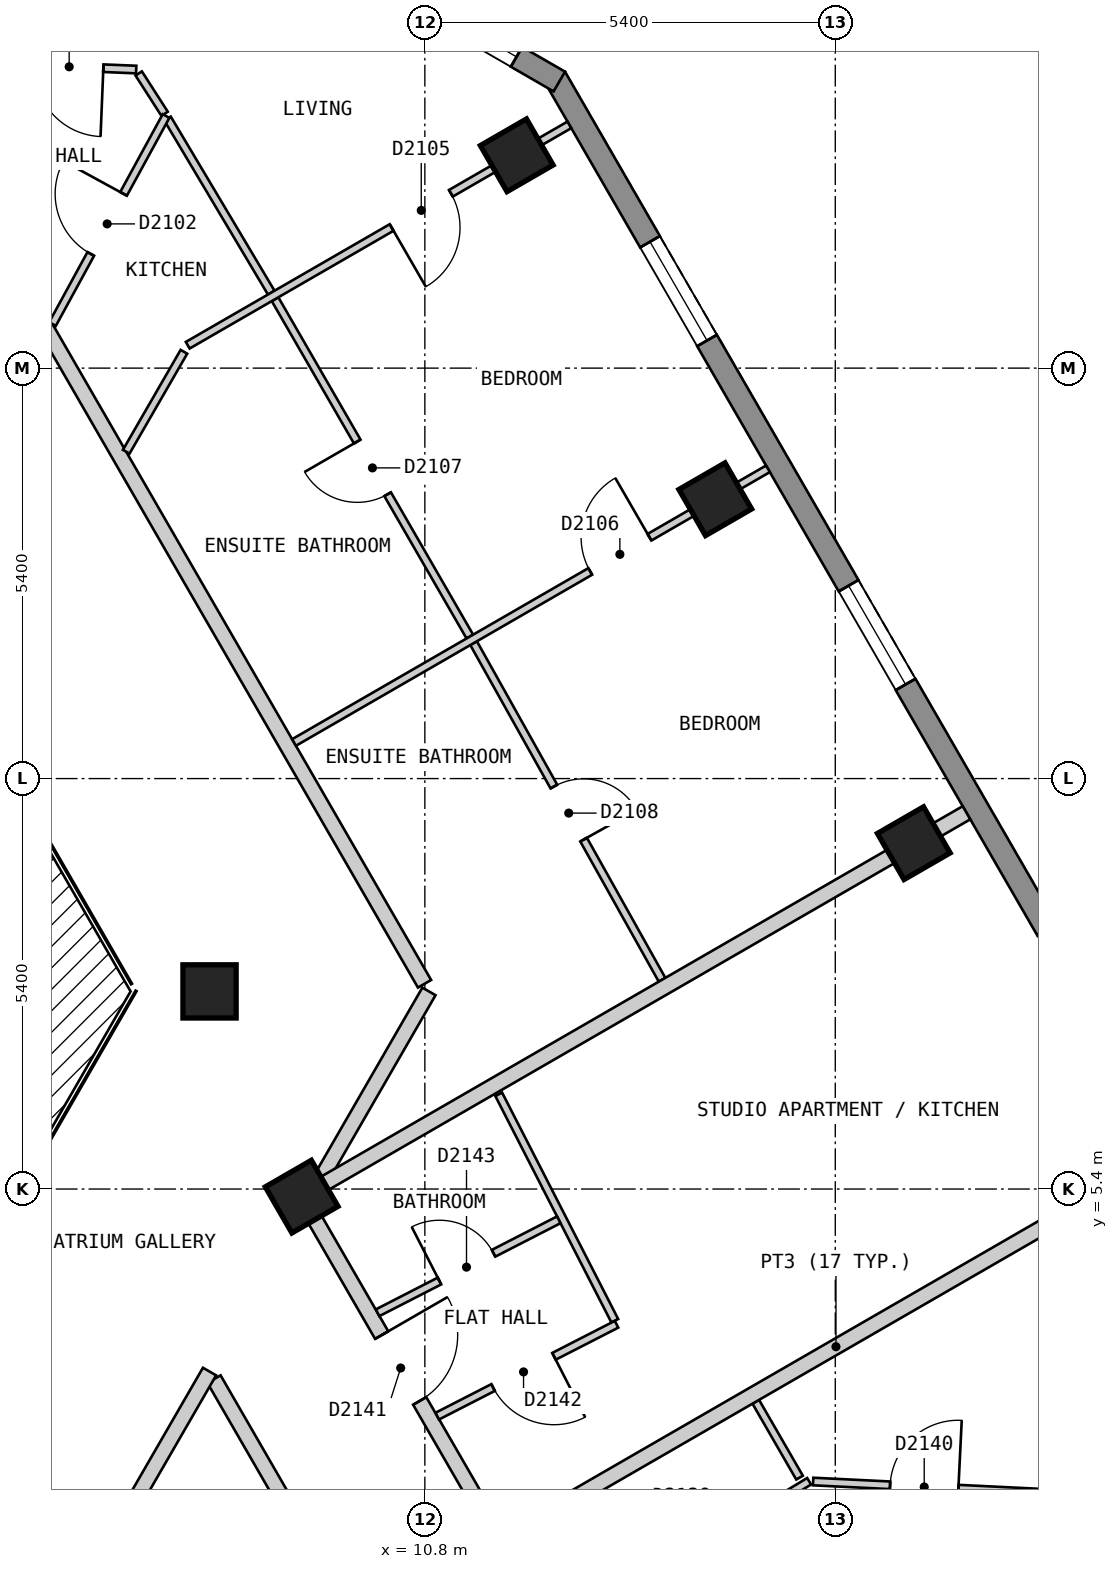
"""IFC4 building model, lengths in metres.
Left out: names, types, materials, properties, quantities, classifications, styles, units other than length and angle.
Written with IfcOpenShell. Run it as: python <this file> out.ifc"""

import sys

from ifc_helpers import new_model, si_unit, direction, frame, frame_2d, origin, origin_2d, place, context, subcontext, project, spatial, polyline, rectangle, outline, extrude, element, fill, save


model = new_model("IFC4")
c1 = context("Model", 3, precision=1e-05, world=origin(), true_north=direction((0.0, 1.0)))
c2 = subcontext(c1, "Body", "Model", "MODEL_VIEW")
j1 = project(units=[si_unit("LENGTHUNIT", "METRE"), si_unit("PLANEANGLEUNIT", "RADIAN")], contexts=[c1])
p1 = place(None, origin())
s1 = spatial("IfcSite", under=j1, at=p1, CompositionType="ELEMENT")
p2 = place(p1, origin())
s2 = spatial("IfcBuilding", under=s1, at=p2, CompositionType="ELEMENT")
p3 = place(p2, frame((0.0, 0.0, 205.8)))
s3 = spatial("IfcBuildingStorey", under=s2, at=p3, CompositionType="ELEMENT", Elevation=205.8)
for number, where, z_axis, x_axis in (
    (1, (17.233, 9.95, 0.0), (0.0, 0.0, 1.0), (-0.5, 0.866, 0.0)),
    (2, (14.621, 14.475, 0.0), (0.0, 0.0, 1.0), (-0.5, 0.866, 0.0)),
    (3, (12.009, 19.0, 0.0), (0.0, 0.0, 1.0), (-0.5, 0.866, 0.0)),
    (4, (9.179, 5.3, 0.0), (0.0, 0.0, 1.0), (-0.5, 0.866, 0.0)),
    (5, (7.967, 8.0, 0.0), (0.0, 0.0, 1.0), (1.0, 0.0, 0.0)),
):
    element("IfcColumn", number, at=place(p3, frame(where, z_axis=z_axis, x_axis=x_axis)), inside=s3, PredefinedType="COLUMN", context=c2, shape_type="SweptSolid", body=[
        extrude(rectangle(XDim=0.7, YDim=0.7, at=origin_2d()), origin(), (0.0, 0.0, 1.0), 3.0),
    ])
p4 = place(p3, frame((23.599, 0.825, 0.0), z_axis=(0.0, 0.0, 1.0), x_axis=(-0.500003656944, 0.866023292436, 0.0)))
e6 = element("IfcWall", 6, at=p4, inside=s3, PredefinedType="SOLIDWALL", context=c2, shape_type="SweptSolid", body=[
    extrude(outline(polyline([(0.0, -0.15), (22.17, -0.15), (22.09, 0.15), (0.08, 0.15), (0.0, -0.15)])), origin(), (0.0, 0.0, 1.0), 2.7),
])
p5 = place(p4, frame((2.497, 0.0, 0.15)))
e7 = element("IfcOpeningElement", 7, at=p5, cuts=e6, PredefinedType="OPENING", context=c2, shape_type="SweptSolid", body=[
    extrude(rectangle(XDim=1.5, YDim=2.1, at=frame_2d((0.75, 1.05))), frame((0.0, 0.16, 0.0), z_axis=(0.0, -1.0, 0.0), x_axis=(1.0, 0.0, 0.0)), (0.0, 0.0, 1.0), 0.32),
])
p6 = place(p4, frame((7.723, 0.0, 0.15)))
e8 = element("IfcOpeningElement", 8, at=p6, cuts=e6, PredefinedType="OPENING", context=c2, shape_type="SweptSolid", body=[
    extrude(rectangle(XDim=1.5, YDim=2.1, at=frame_2d((0.75, 1.05))), frame((0.0, 0.16, 0.0), z_axis=(0.0, -1.0, 0.0), x_axis=(1.0, 0.0, 0.0)), (0.0, 0.0, 1.0), 0.32),
])
p7 = place(p4, frame((12.948, 0.0, 0.15)))
e9 = element("IfcOpeningElement", 9, at=p7, cuts=e6, PredefinedType="OPENING", context=c2, shape_type="SweptSolid", body=[
    extrude(rectangle(XDim=1.5, YDim=2.1, at=frame_2d((0.75, 1.05))), frame((0.0, 0.16, 0.0), z_axis=(0.0, -1.0, 0.0), x_axis=(1.0, 0.0, 0.0)), (0.0, 0.0, 1.0), 0.32),
])
p8 = place(p4, frame((18.173, 0.0, 0.15)))
e10 = element("IfcOpeningElement", 10, at=p8, cuts=e6, PredefinedType="OPENING", context=c2, shape_type="SweptSolid", body=[
    extrude(rectangle(XDim=1.5, YDim=2.1, at=frame_2d((0.75, 1.05))), frame((0.0, 0.16, 0.0), z_axis=(0.0, -1.0, 0.0), x_axis=(1.0, 0.0, 0.0)), (0.0, 0.0, 1.0), 0.32),
])
p9 = place(p3, frame((12.569, 19.97, 0.0), z_axis=(0.0, 0.0, 1.0), x_axis=(-0.866022959057, 0.500004234368, 0.0)))
e11 = element("IfcWall", 11, at=p9, inside=s3, PredefinedType="SOLIDWALL", context=c2, shape_type="SweptSolid", body=[
    extrude(outline(polyline([(0.0, -0.15), (5.0, -0.15), (4.92, 0.15), (0.08, 0.15), (0.0, -0.15)])), origin(), (0.0, 0.0, 1.0), 2.7),
])
p10 = place(p9, frame((0.65, 0.0, 0.15)))
e12 = element("IfcOpeningElement", 12, at=p10, cuts=e11, PredefinedType="OPENING", context=c2, shape_type="SweptSolid", body=[
    extrude(rectangle(XDim=1.2, YDim=2.1, at=frame_2d((0.6, 1.05))), frame((0.0, 0.16, 0.0), z_axis=(0.0, -1.0, 0.0), x_axis=(1.0, 0.0, 0.0)), (0.0, 0.0, 1.0), 0.32),
])
p11 = place(p3, frame((8.026, 2.899, 0.0), z_axis=(0.0, 0.0, 1.0), x_axis=(0.499986018985, -0.866033475577, 0.0)))
e13 = element("IfcWall", 13, at=p11, inside=s3, PredefinedType="PARTITIONING", context=c2, shape_type="SweptSolid", body=[
    extrude(rectangle(XDim=5.078, YDim=0.2, at=frame_2d((2.539, 0.0))), origin(), (0.0, 0.0, 1.0), 2.7),
])
p12 = place(p11, frame((2.089, 0.0, 0.0)))
e14 = element("IfcOpeningElement", 14, at=p12, cuts=e13, PredefinedType="OPENING", context=c2, shape_type="SweptSolid", body=[
    extrude(rectangle(XDim=0.9, YDim=2.1, at=frame_2d((0.45, 1.05))), frame((0.0, 0.11, 0.0), z_axis=(0.0, -1.0, 0.0), x_axis=(1.0, 0.0, 0.0)), (0.0, 0.0, 1.0), 0.22),
])
p13 = place(p3, frame((9.238, 5.2, 0.0), z_axis=(0.0, 0.0, 1.0), x_axis=(0.500025705601, -0.86601056214, 0.0)))
e15 = element("IfcWall", 15, at=p13, inside=s3, PredefinedType="PARTITIONING", context=c2, shape_type="SweptSolid", body=[
    extrude(rectangle(XDim=7.735, YDim=0.2, at=frame_2d((3.868, 0.0))), origin(), (0.0, 0.0, 1.0), 2.7),
])
p14 = place(p13, frame((6.705, 0.0, 0.0)))
e16 = element("IfcOpeningElement", 16, at=p14, cuts=e15, PredefinedType="OPENING", context=c2, shape_type="SweptSolid", body=[
    extrude(rectangle(XDim=1.0, YDim=2.1, at=frame_2d((0.5, 1.05))), frame((0.0, 0.11, 0.0), z_axis=(0.0, -1.0, 0.0), x_axis=(1.0, 0.0, 0.0)), (0.0, 0.0, 1.0), 0.22),
])
p15 = place(p13, frame((1.988, 0.0, 0.0)))
e17 = element("IfcOpeningElement", 17, at=p15, cuts=e15, PredefinedType="OPENING", context=c2, shape_type="SweptSolid", body=[
    extrude(rectangle(XDim=1.0, YDim=2.1, at=frame_2d((0.5, 1.05))), frame((0.0, 0.11, 0.0), z_axis=(0.0, -1.0, 0.0), x_axis=(1.0, 0.0, 0.0)), (0.0, 0.0, 1.0), 0.22),
])
p16 = place(p3, frame((5.485, 17.3, 0.0), z_axis=(0.0, 0.0, 1.0), x_axis=(0.499943285704, -0.866058145322, 0.0)))
e18 = element("IfcWall", 18, at=p16, inside=s3, PredefinedType="PARTITIONING", context=c2, shape_type="SweptSolid", body=[
    extrude(rectangle(XDim=10.623, YDim=0.2, at=frame_2d((5.312, 0.0))), origin(), (0.0, 0.0, 1.0), 2.7),
])
p17 = place(p3, frame((6.928, 1.2, 0.0), z_axis=(0.0, 0.0, 1.0), x_axis=(0.500132712588, 0.865948768577, 0.0)))
e19 = element("IfcWall", 19, at=p17, inside=s3, PredefinedType="PARTITIONING", context=c2, shape_type="SweptSolid", body=[
    extrude(rectangle(XDim=2.078, YDim=0.2, at=frame_2d((1.039, 0.0))), origin(), (0.0, 0.0, 1.0), 2.7),
])
p18 = place(p3, frame((9.454, 5.574, 0.0), z_axis=(0.0, 0.0, 1.0), x_axis=(0.499795394297, 0.86614350072, 0.0)))
e20 = element("IfcWall", 20, at=p18, inside=s3, PredefinedType="PARTITIONING", context=c2, shape_type="SweptSolid", body=[
    extrude(rectangle(XDim=2.801, YDim=0.2, at=frame_2d((1.4, 0.0))), origin(), (0.0, 0.0, 1.0), 2.7),
])
p19 = place(p3, frame((7.035, 20.077, 0.0), z_axis=(0.0, 0.0, 1.0), x_axis=(0.540425167977, -0.841392083286, 0.0)))
e21 = element("IfcWall", 21, at=p19, inside=s3, PredefinedType="PARTITIONING", context=c2, shape_type="SweptSolid", body=[
    extrude(rectangle(XDim=0.631, YDim=0.1, at=frame_2d((0.315, 0.0))), origin(), (0.0, 0.0, 1.0), 2.7),
])
p20 = place(p3, frame((7.414, 19.484, 0.0), z_axis=(0.0, 0.0, 1.0), x_axis=(0.511881371655, -0.859056145634, 0.0)))
e22 = element("IfcWall", 22, at=p20, inside=s3, PredefinedType="PARTITIONING", context=c2, shape_type="SweptSolid", body=[
    extrude(rectangle(XDim=2.667, YDim=0.1, at=frame_2d((1.333, 0.0))), origin(), (0.0, 0.0, 1.0), 2.7),
])
p21 = place(p3, frame((15.154, 2.601, 0.0), z_axis=(0.0, 0.0, 1.0), x_axis=(0.499808046739, -0.866136199691, 0.0)))
e23 = element("IfcWall", 23, at=p21, inside=s3, PredefinedType="PARTITIONING", context=c2, shape_type="SweptSolid", body=[
    extrude(rectangle(XDim=1.152, YDim=0.1, at=frame_2d((0.576, 0.0))), origin(), (0.0, 0.0, 1.0), 2.7),
])
p22 = place(p3, frame((8.829, 17.107, 0.0), z_axis=(0.0, 0.0, 1.0), x_axis=(0.500022055211, -0.866012669828, 0.0)))
e24 = element("IfcWall", 24, at=p22, inside=s3, PredefinedType="PARTITIONING", context=c2, shape_type="SweptSolid", body=[
    extrude(rectangle(XDim=5.126, YDim=0.1, at=frame_2d((2.563, 0.0))), origin(), (0.0, 0.0, 1.0), 2.7),
])
p23 = place(p22, frame((2.163, 0.0, 0.0)))
e25 = element("IfcOpeningElement", 25, at=p23, cuts=e24, PredefinedType="OPENING", context=c2, shape_type="SweptSolid", body=[
    extrude(rectangle(XDim=0.8, YDim=2.1, at=frame_2d((0.4, 1.05))), frame((0.0, 0.06, 0.0), z_axis=(0.0, -1.0, 0.0), x_axis=(1.0, 0.0, 0.0)), (0.0, 0.0, 1.0), 0.12),
])
p24 = place(p3, frame((11.441, 12.582, 0.0), z_axis=(0.0, 0.0, 1.0), x_axis=(0.488568218554, -0.872525699231, 0.0)))
e26 = element("IfcWall", 26, at=p24, inside=s3, PredefinedType="PARTITIONING", context=c2, shape_type="SweptSolid", body=[
    extrude(rectangle(XDim=5.076, YDim=0.1, at=frame_2d((2.538, 0.0))), origin(), (0.0, 0.0, 1.0), 2.7),
])
p25 = place(p24, frame((2.163, 0.0, 0.0)))
e27 = element("IfcOpeningElement", 27, at=p25, cuts=e26, PredefinedType="OPENING", context=c2, shape_type="SweptSolid", body=[
    extrude(rectangle(XDim=0.8, YDim=2.1, at=frame_2d((0.4, 1.05))), frame((0.0, 0.06, 0.0), z_axis=(0.0, -1.0, 0.0), x_axis=(1.0, 0.0, 0.0)), (0.0, 0.0, 1.0), 0.12),
])
p26 = place(p3, frame((11.772, 6.646, 0.0), z_axis=(0.0, 0.0, 1.0), x_axis=(0.456175983405, -0.889889584254, 0.0)))
e28 = element("IfcWall", 28, at=p26, inside=s3, PredefinedType="PARTITIONING", context=c2, shape_type="SweptSolid", body=[
    extrude(rectangle(XDim=3.348, YDim=0.1, at=frame_2d((1.674, 0.0))), origin(), (0.0, 0.0, 1.0), 2.7),
])
p27 = place(p3, frame((5.294, 20.198, 0.0), z_axis=(0.0, 0.0, 1.0), x_axis=(0.999159599203, -0.040988965834, 0.0)))
e29 = element("IfcWall", 29, at=p27, inside=s3, PredefinedType="PARTITIONING", context=c2, shape_type="SweptSolid", body=[
    extrude(rectangle(XDim=1.709, YDim=0.1, at=frame_2d((0.855, 0.0))), origin(), (0.0, 0.0, 1.0), 2.7),
])
p28 = place(p27, frame((0.377, 0.0, 0.0)))
e30 = element("IfcOpeningElement", 30, at=p28, cuts=e29, PredefinedType="OPENING", context=c2, shape_type="SweptSolid", body=[
    extrude(rectangle(XDim=0.9, YDim=2.1, at=frame_2d((0.45, 1.05))), frame((0.0, 0.06, 0.0), z_axis=(0.0, -1.0, 0.0), x_axis=(1.0, 0.0, 0.0)), (0.0, 0.0, 1.0), 0.12),
])
p29 = place(p3, frame((15.909, 1.552, 0.0), z_axis=(0.0, 0.0, 1.0), x_axis=(0.998799003463, -0.048995414909, 0.0)))
e31 = element("IfcWall", 31, at=p29, inside=s3, PredefinedType="PARTITIONING", context=c2, shape_type="SweptSolid", body=[
    extrude(rectangle(XDim=3.244, YDim=0.1, at=frame_2d((1.622, 0.0))), origin(), (0.0, 0.0, 1.0), 2.7),
])
p30 = place(p29, frame((1.013, 0.0, 0.0)))
e32 = element("IfcOpeningElement", 32, at=p30, cuts=e31, PredefinedType="OPENING", context=c2, shape_type="SweptSolid", body=[
    extrude(rectangle(XDim=0.9, YDim=2.1, at=frame_2d((0.45, 1.05))), frame((0.0, 0.06, 0.0), z_axis=(0.0, -1.0, 0.0), x_axis=(1.0, 0.0, 0.0)), (0.0, 0.0, 1.0), 0.12),
])
p31 = place(p3, frame((6.871, 15.1, 0.0), z_axis=(0.0, 0.0, 1.0), x_axis=(0.499805980977, 0.866137391745, 0.0)))
e33 = element("IfcWall", 33, at=p31, inside=s3, PredefinedType="PARTITIONING", context=c2, shape_type="SweptSolid", body=[
    extrude(rectangle(XDim=1.518, YDim=0.1, at=frame_2d((0.759, 0.0))), origin(), (0.0, 0.0, 1.0), 2.7),
])
p32 = place(p3, frame((5.901, 16.78, 0.0), z_axis=(0.0, 0.0, 1.0), x_axis=(0.479148317257, 0.877733951759, 0.0)))
e34 = element("IfcWall", 34, at=p32, inside=s3, PredefinedType="PARTITIONING", context=c2, shape_type="SweptSolid", body=[
    extrude(rectangle(XDim=3.118, YDim=0.1, at=frame_2d((1.559, 0.0))), origin(), (0.0, 0.0, 1.0), 2.7),
])
p33 = place(p32, frame((1.051, 0.0, 0.0)))
e35 = element("IfcOpeningElement", 35, at=p33, cuts=e34, PredefinedType="OPENING", context=c2, shape_type="SweptSolid", body=[
    extrude(rectangle(XDim=0.9, YDim=2.1, at=frame_2d((0.45, 1.05))), frame((0.0, 0.06, 0.0), z_axis=(0.0, -1.0, 0.0), x_axis=(1.0, 0.0, 0.0)), (0.0, 0.0, 1.0), 0.12),
])
p34 = place(p3, frame((10.178, 3.772, 0.0), z_axis=(0.0, 0.0, 1.0), x_axis=(0.889732071959, 0.456483121405, 0.0)))
e36 = element("IfcWall", 36, at=p34, inside=s3, PredefinedType="PARTITIONING", context=c2, shape_type="SweptSolid", body=[
    extrude(rectangle(XDim=2.679, YDim=0.1, at=frame_2d((1.34, 0.0))), origin(), (0.0, 0.0, 1.0), 2.7),
])
p35 = place(p34, frame((0.915, 0.0, 0.0)))
e37 = element("IfcOpeningElement", 37, at=p35, cuts=e36, PredefinedType="OPENING", context=c2, shape_type="SweptSolid", body=[
    extrude(rectangle(XDim=0.8, YDim=2.1, at=frame_2d((0.4, 1.05))), frame((0.0, 0.06, 0.0), z_axis=(0.0, -1.0, 0.0), x_axis=(1.0, 0.0, 0.0)), (0.0, 0.0, 1.0), 0.12),
])
p36 = place(p3, frame((10.963, 2.412, 0.0), z_axis=(0.0, 0.0, 1.0), x_axis=(0.889943997558, 0.456069820543, 0.0)))
e38 = element("IfcWall", 38, at=p36, inside=s3, PredefinedType="PARTITIONING", context=c2, shape_type="SweptSolid", body=[
    extrude(rectangle(XDim=2.651, YDim=0.1, at=frame_2d((1.325, 0.0))), origin(), (0.0, 0.0, 1.0), 2.7),
])
p37 = place(p36, frame((0.826, 0.0, 0.0)))
e39 = element("IfcOpeningElement", 39, at=p37, cuts=e38, PredefinedType="OPENING", context=c2, shape_type="SweptSolid", body=[
    extrude(rectangle(XDim=0.9, YDim=2.1, at=frame_2d((0.45, 1.05))), frame((0.0, 0.06, 0.0), z_axis=(0.0, -1.0, 0.0), x_axis=(1.0, 0.0, 0.0)), (0.0, 0.0, 1.0), 0.12),
])
p38 = place(p3, frame((9.079, 11.275, 0.0), z_axis=(0.0, 0.0, 1.0), x_axis=(0.866001485781, 0.500041424909, 0.0)))
e40 = element("IfcWall", 40, at=p38, inside=s3, PredefinedType="PARTITIONING", context=c2, shape_type="SweptSolid", body=[
    extrude(rectangle(XDim=7.2, YDim=0.1, at=frame_2d((3.6, 0.0))), origin(), (0.0, 0.0, 1.0), 2.7),
])
p39 = place(p38, frame((4.5, 0.0, 0.0)))
e41 = element("IfcOpeningElement", 41, at=p39, cuts=e40, PredefinedType="OPENING", context=c2, shape_type="SweptSolid", body=[
    extrude(rectangle(XDim=0.9, YDim=2.1, at=frame_2d((0.45, 1.05))), frame((0.0, 0.06, 0.0), z_axis=(0.0, -1.0, 0.0), x_axis=(1.0, 0.0, 0.0)), (0.0, 0.0, 1.0), 0.12),
])
p40 = place(p3, frame((7.68, 16.501, 0.0), z_axis=(0.0, 0.0, 1.0), x_axis=(0.86602149507, 0.500006770031, 0.0)))
e42 = element("IfcWall", 42, at=p40, inside=s3, PredefinedType="PARTITIONING", context=c2, shape_type="SweptSolid", body=[
    extrude(rectangle(XDim=5.798, YDim=0.1, at=frame_2d((2.899, 0.0))), origin(), (0.0, 0.0, 1.0), 2.7),
])
p41 = place(p40, frame((3.098, 0.0, 0.0)))
e43 = element("IfcOpeningElement", 43, at=p41, cuts=e42, PredefinedType="OPENING", context=c2, shape_type="SweptSolid", body=[
    extrude(rectangle(XDim=0.9, YDim=2.1, at=frame_2d((0.45, 1.05))), frame((0.0, 0.06, 0.0), z_axis=(0.0, -1.0, 0.0), x_axis=(1.0, 0.0, 0.0)), (0.0, 0.0, 1.0), 0.12),
])
p42 = place(p3, frame((12.593, -0.411, 0.0), z_axis=(0.0, 0.0, 1.0), x_axis=(0.856558445359, 0.516050026339, 0.0)))
e44 = element("IfcWall", 44, at=p42, inside=s3, PredefinedType="PARTITIONING", context=c2, shape_type="SweptSolid", body=[
    extrude(rectangle(XDim=3.809, YDim=0.1, at=frame_2d((1.905, 0.0))), origin(), (0.0, 0.0, 1.0), 2.7),
])
p43 = place(p42, frame((1.455, 0.0, 0.0)))
e45 = element("IfcOpeningElement", 45, at=p43, cuts=e44, PredefinedType="OPENING", context=c2, shape_type="SweptSolid", body=[
    extrude(rectangle(XDim=0.8, YDim=2.1, at=frame_2d((0.4, 1.05))), frame((0.0, 0.06, 0.0), z_axis=(0.0, -1.0, 0.0), x_axis=(1.0, 0.0, 0.0)), (0.0, 0.0, 1.0), 0.12),
])
p44 = place(p3, frame((11.879, 0.826, 0.0), z_axis=(0.0, 0.0, 1.0), x_axis=(0.866065245018, 0.499930986609, 0.0)))
e46 = element("IfcWall", 46, at=p44, inside=s3, PredefinedType="PARTITIONING", context=c2, shape_type="SweptSolid", body=[
    extrude(rectangle(XDim=10.0, YDim=0.2, at=frame_2d((5.0, 0.0))), origin(), (0.0, 0.0, 1.0), 2.7),
])
p45 = place(p3, frame((9.354, 5.401, 0.0), z_axis=(0.0, 0.0, 1.0), x_axis=(0.866018411306, 0.500012111133, 0.0)))
e47 = element("IfcWall", 47, at=p45, inside=s3, PredefinedType="PARTITIONING", context=c2, shape_type="SweptSolid", body=[
    extrude(rectangle(XDim=9.898, YDim=0.2, at=frame_2d((4.949, 0.0))), origin(), (0.0, 0.0, 1.0), 2.7),
])
p46 = place(p7, origin())
e48 = element("IfcWindow", 48, at=p46, inside=s3, PartitioningType="SINGLE_PANEL", PredefinedType="WINDOW", context=c2, shape_type="SweptSolid", body=[
    extrude(rectangle(XDim=1.5, YDim=2.1, at=frame_2d((0.75, 1.05))), frame((0.0, 0.03, 0.0), z_axis=(0.0, -1.0, 0.0), x_axis=(1.0, 0.0, 0.0)), (0.0, 0.0, 1.0), 0.06),
])
fill(e9, e48)
p47 = place(p8, origin())
e49 = element("IfcWindow", 49, at=p47, inside=s3, PartitioningType="SINGLE_PANEL", PredefinedType="WINDOW", context=c2, shape_type="SweptSolid", body=[
    extrude(rectangle(XDim=1.5, YDim=2.1, at=frame_2d((0.75, 1.05))), frame((0.0, 0.03, 0.0), z_axis=(0.0, -1.0, 0.0), x_axis=(1.0, 0.0, 0.0)), (0.0, 0.0, 1.0), 0.06),
])
fill(e10, e49)
p48 = place(p10, origin())
e50 = element("IfcWindow", 50, at=p48, inside=s3, PartitioningType="SINGLE_PANEL", PredefinedType="WINDOW", context=c2, shape_type="SweptSolid", body=[
    extrude(rectangle(XDim=1.2, YDim=2.1, at=frame_2d((0.6, 1.05))), frame((0.0, 0.03, 0.0), z_axis=(0.0, -1.0, 0.0), x_axis=(1.0, 0.0, 0.0)), (0.0, 0.0, 1.0), 0.06),
])
fill(e12, e50)
p49 = place(p33, origin())
e51 = element("IfcDoor", 51, at=p49, inside=s3, OperationType="SINGLE_SWING_RIGHT", PredefinedType="DOOR", context=c2, shape_type="SweptSolid", body=[
    extrude(rectangle(XDim=0.9, YDim=2.1, at=frame_2d((0.45, 1.05))), frame((0.0, 0.025, 0.0), z_axis=(0.0, -1.0, 0.0), x_axis=(1.0, 0.0, 0.0)), (0.0, 0.0, 1.0), 0.05),
])
fill(e35, e51)
p50 = place(p28, origin())
e52 = element("IfcDoor", 52, at=p50, inside=s3, OperationType="SINGLE_SWING_RIGHT", PredefinedType="DOOR", context=c2, shape_type="SweptSolid", body=[
    extrude(rectangle(XDim=0.9, YDim=2.1, at=frame_2d((0.45, 1.05))), frame((0.0, 0.025, 0.0), z_axis=(0.0, -1.0, 0.0), x_axis=(1.0, 0.0, 0.0)), (0.0, 0.0, 1.0), 0.05),
])
fill(e30, e52)
p51 = place(p41, origin())
e53 = element("IfcDoor", 53, at=p51, inside=s3, OperationType="SINGLE_SWING_LEFT", PredefinedType="DOOR", context=c2, shape_type="SweptSolid", body=[
    extrude(rectangle(XDim=0.9, YDim=2.1, at=frame_2d((0.45, 1.05))), frame((0.0, 0.025, 0.0), z_axis=(0.0, -1.0, 0.0), x_axis=(1.0, 0.0, 0.0)), (0.0, 0.0, 1.0), 0.05),
])
fill(e43, e53)
p52 = place(p39, origin())
e54 = element("IfcDoor", 54, at=p52, inside=s3, OperationType="SINGLE_SWING_RIGHT", PredefinedType="DOOR", context=c2, shape_type="SweptSolid", body=[
    extrude(rectangle(XDim=0.9, YDim=2.1, at=frame_2d((0.45, 1.05))), frame((0.0, 0.025, 0.0), z_axis=(0.0, -1.0, 0.0), x_axis=(1.0, 0.0, 0.0)), (0.0, 0.0, 1.0), 0.05),
])
fill(e41, e54)
p53 = place(p23, origin())
e55 = element("IfcDoor", 55, at=p53, inside=s3, OperationType="SINGLE_SWING_LEFT", PredefinedType="DOOR", context=c2, shape_type="SweptSolid", body=[
    extrude(rectangle(XDim=0.8, YDim=2.1, at=frame_2d((0.4, 1.05))), frame((0.0, 0.025, 0.0), z_axis=(0.0, -1.0, 0.0), x_axis=(1.0, 0.0, 0.0)), (0.0, 0.0, 1.0), 0.05),
])
fill(e25, e55)
p54 = place(p25, origin())
e56 = element("IfcDoor", 56, at=p54, inside=s3, OperationType="SINGLE_SWING_RIGHT", PredefinedType="DOOR", context=c2, shape_type="SweptSolid", body=[
    extrude(rectangle(XDim=0.8, YDim=2.1, at=frame_2d((0.4, 1.05))), frame((0.0, 0.025, 0.0), z_axis=(0.0, -1.0, 0.0), x_axis=(1.0, 0.0, 0.0)), (0.0, 0.0, 1.0), 0.05),
])
fill(e27, e56)
p55 = place(p30, origin())
e57 = element("IfcDoor", 57, at=p55, inside=s3, OperationType="SINGLE_SWING_RIGHT", PredefinedType="DOOR", context=c2, shape_type="SweptSolid", body=[
    extrude(rectangle(XDim=0.9, YDim=2.1, at=frame_2d((0.45, 1.05))), frame((0.0, 0.025, 0.0), z_axis=(0.0, -1.0, 0.0), x_axis=(1.0, 0.0, 0.0)), (0.0, 0.0, 1.0), 0.05),
])
fill(e32, e57)
p56 = place(p15, origin())
e58 = element("IfcDoor", 58, at=p56, inside=s3, OperationType="SINGLE_SWING_LEFT", PredefinedType="DOOR", context=c2, shape_type="SweptSolid", body=[
    extrude(rectangle(XDim=1.0, YDim=2.1, at=frame_2d((0.5, 1.05))), frame((0.0, 0.025, 0.0), z_axis=(0.0, -1.0, 0.0), x_axis=(1.0, 0.0, 0.0)), (0.0, 0.0, 1.0), 0.05),
])
fill(e17, e58)
p57 = place(p37, origin())
e59 = element("IfcDoor", 59, at=p57, inside=s3, OperationType="SINGLE_SWING_RIGHT", PredefinedType="DOOR", context=c2, shape_type="SweptSolid", body=[
    extrude(rectangle(XDim=0.9, YDim=2.1, at=frame_2d((0.45, 1.05))), frame((0.0, 0.025, 0.0), z_axis=(0.0, -1.0, 0.0), x_axis=(1.0, 0.0, 0.0)), (0.0, 0.0, 1.0), 0.05),
])
fill(e39, e59)
p58 = place(p35, origin())
e60 = element("IfcDoor", 60, at=p58, inside=s3, OperationType="SINGLE_SWING_LEFT", PredefinedType="DOOR", context=c2, shape_type="SweptSolid", body=[
    extrude(rectangle(XDim=0.8, YDim=2.1, at=frame_2d((0.4, 1.05))), frame((0.0, 0.025, 0.0), z_axis=(0.0, -1.0, 0.0), x_axis=(1.0, 0.0, 0.0)), (0.0, 0.0, 1.0), 0.05),
])
fill(e37, e60)
save(model, sys.argv[1])
